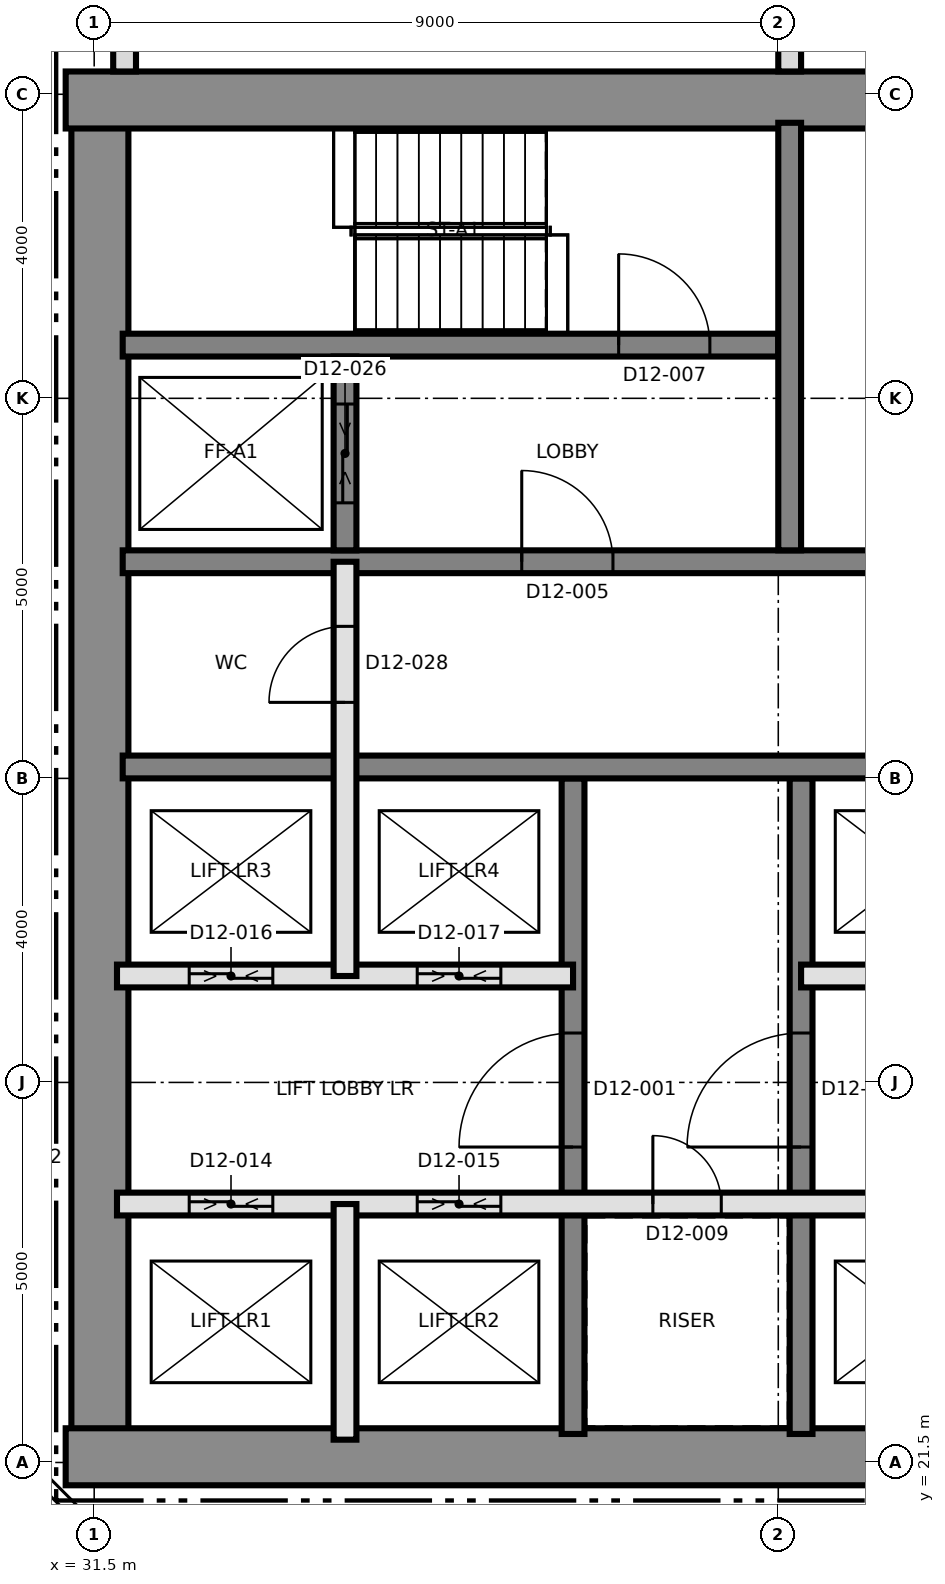
"""IFC4 building model, lengths in metres.
Left out: names, types, materials, properties, quantities, classifications, styles, units other than length and angle.
Written with IfcOpenShell. Run it as: python <this file> out.ifc"""

import sys

from ifc_helpers import new_model, si_unit, direction, frame, frame_2d, origin, place, context, subcontext, project, spatial, rectangle, extrude, element, fill, save


model = new_model("IFC4")
c1 = context("Model", 3, precision=1e-05, world=origin(), true_north=direction((0.0, 1.0)))
c2 = subcontext(c1, "Body", "Model", "MODEL_VIEW")
j1 = project(units=[si_unit("LENGTHUNIT", "METRE"), si_unit("PLANEANGLEUNIT", "RADIAN")], contexts=[c1])
p1 = place(None, origin())
s1 = spatial("IfcSite", under=j1, at=p1, CompositionType="ELEMENT")
p2 = place(p1, origin())
s2 = spatial("IfcBuilding", under=s1, at=p2, CompositionType="ELEMENT")
p3 = place(p2, frame((0.0, 0.0, 135.2)))
s3 = spatial("IfcBuildingStorey", under=s2, at=p3, CompositionType="ELEMENT", Elevation=135.2)
p4 = place(p3, frame((31.575, 21.875, 0.0), z_axis=(0.0, 0.0, 1.0), x_axis=(0.0, 1.0, 0.0)))
e1 = element("IfcWall", 1, at=p4, inside=s3, PredefinedType="SHEAR", context=c2, shape_type="SweptSolid", body=[
    extrude(rectangle(XDim=17.25, YDim=0.75, at=frame_2d((8.625, 0.0))), origin(), (0.0, 0.0, 1.0), 7.0),
])
p5 = place(p3, frame((31.125, 21.575, 0.0), z_axis=(0.0, 0.0, 1.0), x_axis=(1.0, 0.0, 0.0)))
e2 = element("IfcWall", 2, at=p5, inside=s3, PredefinedType="SHEAR", context=c2, shape_type="SweptSolid", body=[
    extrude(rectangle(XDim=27.0, YDim=0.75, at=frame_2d((13.5, 0.0))), origin(), (0.0, 0.0, 1.0), 7.0),
])
p6 = place(p3, frame((31.125, 39.425, 0.0), z_axis=(0.0, 0.0, 1.0), x_axis=(1.0, 0.0, 0.0)))
e3 = element("IfcWall", 3, at=p6, inside=s3, PredefinedType="SHEAR", context=c2, shape_type="SweptSolid", body=[
    extrude(rectangle(XDim=27.0, YDim=0.75, at=frame_2d((13.5, 0.0))), origin(), (0.0, 0.0, 1.0), 7.0),
])
p7 = place(p6, frame((10.575, 0.0, 0.0)))
e4 = element("IfcOpeningElement", 4, at=p7, cuts=e3, PredefinedType="OPENING", context=c2, shape_type="SweptSolid", body=[
    extrude(rectangle(XDim=1.2, YDim=2.1, at=frame_2d((0.6, 1.05))), frame((0.0, 0.385, 0.0), z_axis=(0.0, -1.0, 0.0), x_axis=(1.0, 0.0, 0.0)), (0.0, 0.0, 1.0), 0.77),
])
p8 = place(p3, frame((37.8, 21.875, 0.0), z_axis=(0.0, 0.0, 1.0), x_axis=(0.0, 1.0, 0.0)))
e5 = element("IfcWall", 5, at=p8, inside=s3, PredefinedType="SHEAR", context=c2, shape_type="SweptSolid", body=[
    extrude(rectangle(XDim=8.625, YDim=0.3, at=frame_2d((4.312, 0.0))), origin(), (0.0, 0.0, 1.0), 7.0),
])
p9 = place(p8, frame((3.775, 0.0, 0.0)))
e6 = element("IfcOpeningElement", 6, at=p9, cuts=e5, PredefinedType="OPENING", context=c2, shape_type="SweptSolid", body=[
    extrude(rectangle(XDim=1.5, YDim=2.1, at=frame_2d((0.75, 1.05))), frame((0.0, 0.16, 0.0), z_axis=(0.0, -1.0, 0.0), x_axis=(1.0, 0.0, 0.0)), (0.0, 0.0, 1.0), 0.32),
])
p10 = place(p3, frame((40.8, 21.875, 0.0), z_axis=(0.0, 0.0, 1.0), x_axis=(0.0, 1.0, 0.0)))
e7 = element("IfcWall", 7, at=p10, inside=s3, PredefinedType="SHEAR", context=c2, shape_type="SweptSolid", body=[
    extrude(rectangle(XDim=8.625, YDim=0.3, at=frame_2d((4.312, 0.0))), origin(), (0.0, 0.0, 1.0), 7.0),
])
p11 = place(p10, frame((3.775, 0.0, 0.0)))
e8 = element("IfcOpeningElement", 8, at=p11, cuts=e7, PredefinedType="OPENING", context=c2, shape_type="SweptSolid", body=[
    extrude(rectangle(XDim=1.5, YDim=2.1, at=frame_2d((0.75, 1.05))), frame((0.0, 0.16, 0.0), z_axis=(0.0, -1.0, 0.0), x_axis=(1.0, 0.0, 0.0)), (0.0, 0.0, 1.0), 0.32),
])
p12 = place(p3, frame((31.875, 30.65, 0.0), z_axis=(0.0, 0.0, 1.0), x_axis=(1.0, 0.0, 0.0)))
e9 = element("IfcWall", 9, at=p12, inside=s3, PredefinedType="SHEAR", context=c2, shape_type="SweptSolid", body=[
    extrude(rectangle(XDim=26.25, YDim=0.3, at=frame_2d((13.125, 0.0))), origin(), (0.0, 0.0, 1.0), 7.0),
])
p13 = place(p12, frame((24.625, 0.0, 0.0)))
e10 = element("IfcOpeningElement", 10, at=p13, cuts=e9, PredefinedType="OPENING", context=c2, shape_type="SweptSolid", body=[
    extrude(rectangle(XDim=1.0, YDim=2.1, at=frame_2d((0.5, 1.05))), frame((0.0, 0.16, 0.0), z_axis=(0.0, -1.0, 0.0), x_axis=(1.0, 0.0, 0.0)), (0.0, 0.0, 1.0), 0.32),
])
p14 = place(p3, frame((31.875, 33.35, 0.0), z_axis=(0.0, 0.0, 1.0), x_axis=(1.0, 0.0, 0.0)))
e11 = element("IfcWall", 11, at=p14, inside=s3, PredefinedType="SHEAR", context=c2, shape_type="SweptSolid", body=[
    extrude(rectangle(XDim=26.25, YDim=0.3, at=frame_2d((13.125, 0.0))), origin(), (0.0, 0.0, 1.0), 7.0),
])
p15 = place(p14, frame((13.775, 0.0, 0.0)))
e12 = element("IfcOpeningElement", 12, at=p15, cuts=e11, PredefinedType="OPENING", context=c2, shape_type="SweptSolid", body=[
    extrude(rectangle(XDim=1.4, YDim=2.1, at=frame_2d((0.7, 1.05))), frame((0.0, 0.16, 0.0), z_axis=(0.0, -1.0, 0.0), x_axis=(1.0, 0.0, 0.0)), (0.0, 0.0, 1.0), 0.32),
])
p16 = place(p14, frame((5.25, 0.0, 0.0)))
e13 = element("IfcOpeningElement", 13, at=p16, cuts=e11, PredefinedType="OPENING", context=c2, shape_type="SweptSolid", body=[
    extrude(rectangle(XDim=1.2, YDim=2.1, at=frame_2d((0.6, 1.05))), frame((0.0, 0.16, 0.0), z_axis=(0.0, -1.0, 0.0), x_axis=(1.0, 0.0, 0.0)), (0.0, 0.0, 1.0), 0.32),
])
p17 = place(p14, frame((19.8, 0.0, 0.0)))
e14 = element("IfcOpeningElement", 14, at=p17, cuts=e11, PredefinedType="OPENING", context=c2, shape_type="SweptSolid", body=[
    extrude(rectangle(XDim=1.2, YDim=2.1, at=frame_2d((0.6, 1.05))), frame((0.0, 0.16, 0.0), z_axis=(0.0, -1.0, 0.0), x_axis=(1.0, 0.0, 0.0)), (0.0, 0.0, 1.0), 0.32),
])
p18 = place(p3, frame((31.875, 36.2, 0.0), z_axis=(0.0, 0.0, 1.0), x_axis=(1.0, 0.0, 0.0)))
e15 = element("IfcWall", 15, at=p18, inside=s3, PredefinedType="SHEAR", context=c2, shape_type="SweptSolid", body=[
    extrude(rectangle(XDim=8.625, YDim=0.3, at=frame_2d((4.312, 0.0))), origin(), (0.0, 0.0, 1.0), 7.0),
])
p19 = place(p18, frame((6.525, 0.0, 0.0)))
e16 = element("IfcOpeningElement", 16, at=p19, cuts=e15, PredefinedType="OPENING", context=c2, shape_type="SweptSolid", body=[
    extrude(rectangle(XDim=1.2, YDim=2.1, at=frame_2d((0.6, 1.05))), frame((0.0, 0.16, 0.0), z_axis=(0.0, -1.0, 0.0), x_axis=(1.0, 0.0, 0.0)), (0.0, 0.0, 1.0), 0.32),
])
p20 = place(p3, frame((40.65, 33.5, 0.0), z_axis=(0.0, 0.0, 1.0), x_axis=(0.0, 1.0, 0.0)))
e17 = element("IfcWall", 17, at=p20, inside=s3, PredefinedType="SHEAR", context=c2, shape_type="SweptSolid", body=[
    extrude(rectangle(XDim=5.625, YDim=0.3, at=frame_2d((2.812, 0.0))), origin(), (0.0, 0.0, 1.0), 7.0),
])
p21 = place(p3, frame((34.8, 33.5, 0.0), z_axis=(0.0, 0.0, 1.0), x_axis=(0.0, 1.0, 0.0)))
e18 = element("IfcWall", 18, at=p21, inside=s3, PredefinedType="SHEAR", context=c2, shape_type="SweptSolid", body=[
    extrude(rectangle(XDim=2.55, YDim=0.3, at=frame_2d((1.275, 0.0))), origin(), (0.0, 0.0, 1.0), 7.0),
])
p22 = place(p21, frame((0.625, 0.0, 0.0)))
e19 = element("IfcOpeningElement", 19, at=p22, cuts=e18, PredefinedType="OPENING", context=c2, shape_type="SweptSolid", body=[
    extrude(rectangle(XDim=1.3, YDim=2.4, at=frame_2d((0.65, 1.2))), frame((0.0, 0.16, 0.0), z_axis=(0.0, -1.0, 0.0), x_axis=(1.0, 0.0, 0.0)), (0.0, 0.0, 1.0), 0.32),
])
p23 = place(p3, frame((31.8, 24.9, 0.0), z_axis=(0.0, 0.0, 1.0), x_axis=(1.0, 0.0, 0.0)))
e20 = element("IfcWall", 20, at=p23, inside=s3, PredefinedType="SOLIDWALL", context=c2, shape_type="SweptSolid", body=[
    extrude(rectangle(XDim=24.0, YDim=0.3, at=frame_2d((12.0, 0.0))), origin(), (0.0, 0.0, 1.0), 6.7),
])
p24 = place(p23, frame((7.05, 0.0, 0.0)))
e21 = element("IfcOpeningElement", 21, at=p24, cuts=e20, PredefinedType="OPENING", context=c2, shape_type="SweptSolid", body=[
    extrude(rectangle(XDim=0.9, YDim=2.1, at=frame_2d((0.45, 1.05))), frame((0.0, 0.16, 0.0), z_axis=(0.0, -1.0, 0.0), x_axis=(1.0, 0.0, 0.0)), (0.0, 0.0, 1.0), 0.32),
])
p25 = place(p23, frame((16.05, 0.0, 0.0)))
e22 = element("IfcOpeningElement", 22, at=p25, cuts=e20, PredefinedType="OPENING", context=c2, shape_type="SweptSolid", body=[
    extrude(rectangle(XDim=0.9, YDim=2.1, at=frame_2d((0.45, 1.05))), frame((0.0, 0.16, 0.0), z_axis=(0.0, -1.0, 0.0), x_axis=(1.0, 0.0, 0.0)), (0.0, 0.0, 1.0), 0.32),
])
p26 = place(p23, frame((0.95, 0.0, 0.0)))
e23 = element("IfcOpeningElement", 23, at=p26, cuts=e20, PredefinedType="OPENING", context=c2, shape_type="SweptSolid", body=[
    extrude(rectangle(XDim=1.1, YDim=2.4, at=frame_2d((0.55, 1.2))), frame((0.0, 0.16, 0.0), z_axis=(0.0, -1.0, 0.0), x_axis=(1.0, 0.0, 0.0)), (0.0, 0.0, 1.0), 0.32),
])
p27 = place(p23, frame((3.95, 0.0, 0.0)))
e24 = element("IfcOpeningElement", 24, at=p27, cuts=e20, PredefinedType="OPENING", context=c2, shape_type="SweptSolid", body=[
    extrude(rectangle(XDim=1.1, YDim=2.4, at=frame_2d((0.55, 1.2))), frame((0.0, 0.16, 0.0), z_axis=(0.0, -1.0, 0.0), x_axis=(1.0, 0.0, 0.0)), (0.0, 0.0, 1.0), 0.32),
])
p28 = place(p23, frame((9.95, 0.0, 0.0)))
e25 = element("IfcOpeningElement", 25, at=p28, cuts=e20, PredefinedType="OPENING", context=c2, shape_type="SweptSolid", body=[
    extrude(rectangle(XDim=1.1, YDim=2.4, at=frame_2d((0.55, 1.2))), frame((0.0, 0.16, 0.0), z_axis=(0.0, -1.0, 0.0), x_axis=(1.0, 0.0, 0.0)), (0.0, 0.0, 1.0), 0.32),
])
p29 = place(p23, frame((12.95, 0.0, 0.0)))
e26 = element("IfcOpeningElement", 26, at=p29, cuts=e20, PredefinedType="OPENING", context=c2, shape_type="SweptSolid", body=[
    extrude(rectangle(XDim=1.1, YDim=2.4, at=frame_2d((0.55, 1.2))), frame((0.0, 0.16, 0.0), z_axis=(0.0, -1.0, 0.0), x_axis=(1.0, 0.0, 0.0)), (0.0, 0.0, 1.0), 0.32),
])
p30 = place(p23, frame((18.95, 0.0, 0.0)))
e27 = element("IfcOpeningElement", 27, at=p30, cuts=e20, PredefinedType="OPENING", context=c2, shape_type="SweptSolid", body=[
    extrude(rectangle(XDim=1.1, YDim=2.4, at=frame_2d((0.55, 1.2))), frame((0.0, 0.16, 0.0), z_axis=(0.0, -1.0, 0.0), x_axis=(1.0, 0.0, 0.0)), (0.0, 0.0, 1.0), 0.32),
])
p31 = place(p23, frame((21.95, 0.0, 0.0)))
e28 = element("IfcOpeningElement", 28, at=p31, cuts=e20, PredefinedType="OPENING", context=c2, shape_type="SweptSolid", body=[
    extrude(rectangle(XDim=1.1, YDim=2.4, at=frame_2d((0.55, 1.2))), frame((0.0, 0.16, 0.0), z_axis=(0.0, -1.0, 0.0), x_axis=(1.0, 0.0, 0.0)), (0.0, 0.0, 1.0), 0.32),
])
p32 = place(p3, frame((31.8, 27.9, 0.0), z_axis=(0.0, 0.0, 1.0), x_axis=(1.0, 0.0, 0.0)))
e29 = element("IfcWall", 29, at=p32, inside=s3, PredefinedType="SOLIDWALL", context=c2, shape_type="SweptSolid", body=[
    extrude(rectangle(XDim=6.0, YDim=0.3, at=frame_2d((3.0, 0.0))), origin(), (0.0, 0.0, 1.0), 6.7),
])
p33 = place(p32, frame((0.95, 0.0, 0.0)))
e30 = element("IfcOpeningElement", 30, at=p33, cuts=e29, PredefinedType="OPENING", context=c2, shape_type="SweptSolid", body=[
    extrude(rectangle(XDim=1.1, YDim=2.4, at=frame_2d((0.55, 1.2))), frame((0.0, 0.16, 0.0), z_axis=(0.0, -1.0, 0.0), x_axis=(1.0, 0.0, 0.0)), (0.0, 0.0, 1.0), 0.32),
])
p34 = place(p32, frame((3.95, 0.0, 0.0)))
e31 = element("IfcOpeningElement", 31, at=p34, cuts=e29, PredefinedType="OPENING", context=c2, shape_type="SweptSolid", body=[
    extrude(rectangle(XDim=1.1, YDim=2.4, at=frame_2d((0.55, 1.2))), frame((0.0, 0.16, 0.0), z_axis=(0.0, -1.0, 0.0), x_axis=(1.0, 0.0, 0.0)), (0.0, 0.0, 1.0), 0.32),
])
p35 = place(p3, frame((40.8, 27.9, 0.0), z_axis=(0.0, 0.0, 1.0), x_axis=(1.0, 0.0, 0.0)))
e32 = element("IfcWall", 32, at=p35, inside=s3, PredefinedType="SOLIDWALL", context=c2, shape_type="SweptSolid", body=[
    extrude(rectangle(XDim=6.0, YDim=0.3, at=frame_2d((3.0, 0.0))), origin(), (0.0, 0.0, 1.0), 6.7),
])
p36 = place(p35, frame((0.95, 0.0, 0.0)))
e33 = element("IfcOpeningElement", 33, at=p36, cuts=e32, PredefinedType="OPENING", context=c2, shape_type="SweptSolid", body=[
    extrude(rectangle(XDim=1.1, YDim=2.4, at=frame_2d((0.55, 1.2))), frame((0.0, 0.16, 0.0), z_axis=(0.0, -1.0, 0.0), x_axis=(1.0, 0.0, 0.0)), (0.0, 0.0, 1.0), 0.32),
])
p37 = place(p35, frame((3.95, 0.0, 0.0)))
e34 = element("IfcOpeningElement", 34, at=p37, cuts=e32, PredefinedType="OPENING", context=c2, shape_type="SweptSolid", body=[
    extrude(rectangle(XDim=1.1, YDim=2.4, at=frame_2d((0.55, 1.2))), frame((0.0, 0.16, 0.0), z_axis=(0.0, -1.0, 0.0), x_axis=(1.0, 0.0, 0.0)), (0.0, 0.0, 1.0), 0.32),
])
p38 = place(p3, frame((34.8, 21.8, 0.0), z_axis=(0.0, 0.0, 1.0), x_axis=(0.0, 1.0, 0.0)))
e35 = element("IfcWall", 35, at=p38, inside=s3, PredefinedType="SOLIDWALL", context=c2, shape_type="SweptSolid", body=[
    extrude(rectangle(XDim=3.1, YDim=0.3, at=frame_2d((1.55, 0.0))), origin(), (0.0, 0.0, 1.0), 6.7),
])
p39 = place(p3, frame((34.8, 27.9, 0.0), z_axis=(0.0, 0.0, 1.0), x_axis=(0.0, 1.0, 0.0)))
e36 = element("IfcWall", 36, at=p39, inside=s3, PredefinedType="SOLIDWALL", context=c2, shape_type="SweptSolid", body=[
    extrude(rectangle(XDim=5.45, YDim=0.3, at=frame_2d((2.725, 0.0))), origin(), (0.0, 0.0, 1.0), 6.7),
])
p40 = place(p39, frame((3.6, 0.0, 0.0)))
e37 = element("IfcOpeningElement", 37, at=p40, cuts=e36, PredefinedType="OPENING", context=c2, shape_type="SweptSolid", body=[
    extrude(rectangle(XDim=1.0, YDim=2.1, at=frame_2d((0.5, 1.05))), frame((0.0, 0.16, 0.0), z_axis=(0.0, -1.0, 0.0), x_axis=(1.0, 0.0, 0.0)), (0.0, 0.0, 1.0), 0.32),
])
p41 = place(p3, frame((31.9, 39.8, 0.0), z_axis=(0.0, 0.0, 1.0), x_axis=(0.0, 1.0, 0.0)))
e38 = element("IfcWall", 38, at=p41, inside=s3, PredefinedType="PARTITIONING", context=c2, shape_type="SweptSolid", body=[
    extrude(rectangle(XDim=25.65, YDim=0.3, at=frame_2d((12.825, 0.0))), origin(), (0.0, 0.0, 1.0), 6.7),
])
p42 = place(p3, frame((40.65, 39.8, 0.0), z_axis=(0.0, 0.0, 1.0), x_axis=(0.0, 1.0, 0.0)))
e39 = element("IfcWall", 39, at=p42, inside=s3, PredefinedType="PARTITIONING", context=c2, shape_type="SweptSolid", body=[
    extrude(rectangle(XDim=25.95, YDim=0.3, at=frame_2d((12.975, 0.0))), origin(), (0.0, 0.0, 1.0), 6.7),
])
p43 = place(p42, frame((1.35, 0.0, 0.0)))
e40 = element("IfcOpeningElement", 40, at=p43, cuts=e39, PredefinedType="OPENING", context=c2, shape_type="SweptSolid", body=[
    extrude(rectangle(XDim=1.2, YDim=2.1, at=frame_2d((0.6, 1.05))), frame((0.0, 0.16, 0.0), z_axis=(0.0, -1.0, 0.0), x_axis=(1.0, 0.0, 0.0)), (0.0, 0.0, 1.0), 0.32),
])
p44 = place(p42, frame((5.85, 0.0, 0.0)))
e41 = element("IfcOpeningElement", 41, at=p44, cuts=e39, PredefinedType="OPENING", context=c2, shape_type="SweptSolid", body=[
    extrude(rectangle(XDim=1.2, YDim=2.1, at=frame_2d((0.6, 1.05))), frame((0.0, 0.16, 0.0), z_axis=(0.0, -1.0, 0.0), x_axis=(1.0, 0.0, 0.0)), (0.0, 0.0, 1.0), 0.32),
])
p45 = place(p42, frame((10.35, 0.0, 0.0)))
e42 = element("IfcOpeningElement", 42, at=p45, cuts=e39, PredefinedType="OPENING", context=c2, shape_type="SweptSolid", body=[
    extrude(rectangle(XDim=1.2, YDim=2.1, at=frame_2d((0.6, 1.05))), frame((0.0, 0.16, 0.0), z_axis=(0.0, -1.0, 0.0), x_axis=(1.0, 0.0, 0.0)), (0.0, 0.0, 1.0), 0.32),
])
p46 = place(p42, frame((14.85, 0.0, 0.0)))
e43 = element("IfcOpeningElement", 43, at=p46, cuts=e39, PredefinedType="OPENING", context=c2, shape_type="SweptSolid", body=[
    extrude(rectangle(XDim=1.2, YDim=2.1, at=frame_2d((0.6, 1.05))), frame((0.0, 0.16, 0.0), z_axis=(0.0, -1.0, 0.0), x_axis=(1.0, 0.0, 0.0)), (0.0, 0.0, 1.0), 0.32),
])
p47 = place(p42, frame((19.087, 0.0, 0.0)))
e44 = element("IfcOpeningElement", 44, at=p47, cuts=e39, PredefinedType="OPENING", context=c2, shape_type="SweptSolid", body=[
    extrude(rectangle(XDim=1.2, YDim=2.1, at=frame_2d((0.6, 1.05))), frame((0.0, 0.16, 0.0), z_axis=(0.0, -1.0, 0.0), x_axis=(1.0, 0.0, 0.0)), (0.0, 0.0, 1.0), 0.32),
])
p48 = place(p42, frame((23.063, 0.0, 0.0)))
e45 = element("IfcOpeningElement", 45, at=p48, cuts=e39, PredefinedType="OPENING", context=c2, shape_type="SweptSolid", body=[
    extrude(rectangle(XDim=1.2, YDim=2.1, at=frame_2d((0.6, 1.05))), frame((0.0, 0.16, 0.0), z_axis=(0.0, -1.0, 0.0), x_axis=(1.0, 0.0, 0.0)), (0.0, 0.0, 1.0), 0.32),
])
p49 = place(p9, origin())
e46 = element("IfcDoor", 46, at=p49, inside=s3, OperationType="SINGLE_SWING_LEFT", PredefinedType="DOOR", context=c2, shape_type="SweptSolid", body=[
    extrude(rectangle(XDim=1.5, YDim=2.1, at=frame_2d((0.75, 1.05))), frame((0.0, 0.025, 0.0), z_axis=(0.0, -1.0, 0.0), x_axis=(1.0, 0.0, 0.0)), (0.0, 0.0, 1.0), 0.05),
])
fill(e6, e46)
p50 = place(p11, origin())
e47 = element("IfcDoor", 47, at=p50, inside=s3, OperationType="SINGLE_SWING_RIGHT", PredefinedType="DOOR", context=c2, shape_type="SweptSolid", body=[
    extrude(rectangle(XDim=1.5, YDim=2.1, at=frame_2d((0.75, 1.05))), frame((0.0, 0.025, 0.0), z_axis=(0.0, -1.0, 0.0), x_axis=(1.0, 0.0, 0.0)), (0.0, 0.0, 1.0), 0.05),
])
fill(e8, e47)
p51 = place(p16, origin())
e48 = element("IfcDoor", 48, at=p51, inside=s3, OperationType="SINGLE_SWING_LEFT", PredefinedType="DOOR", context=c2, shape_type="SweptSolid", body=[
    extrude(rectangle(XDim=1.2, YDim=2.1, at=frame_2d((0.6, 1.05))), frame((0.0, 0.025, 0.0), z_axis=(0.0, -1.0, 0.0), x_axis=(1.0, 0.0, 0.0)), (0.0, 0.0, 1.0), 0.05),
])
fill(e13, e48)
p52 = place(p19, origin())
e49 = element("IfcDoor", 49, at=p52, inside=s3, OperationType="SINGLE_SWING_RIGHT", PredefinedType="DOOR", context=c2, shape_type="SweptSolid", body=[
    extrude(rectangle(XDim=1.2, YDim=2.1, at=frame_2d((0.6, 1.05))), frame((0.0, 0.025, 0.0), z_axis=(0.0, -1.0, 0.0), x_axis=(1.0, 0.0, 0.0)), (0.0, 0.0, 1.0), 0.05),
])
fill(e16, e49)
p53 = place(p24, origin())
e50 = element("IfcDoor", 50, at=p53, inside=s3, OperationType="SINGLE_SWING_LEFT", PredefinedType="DOOR", context=c2, shape_type="SweptSolid", body=[
    extrude(rectangle(XDim=0.9, YDim=2.1, at=frame_2d((0.45, 1.05))), frame((0.0, 0.025, 0.0), z_axis=(0.0, -1.0, 0.0), x_axis=(1.0, 0.0, 0.0)), (0.0, 0.0, 1.0), 0.05),
])
fill(e21, e50)
p54 = place(p26, origin())
e51 = element("IfcDoor", 51, at=p54, inside=s3, OperationType="SLIDING_TO_LEFT", PredefinedType="DOOR", context=c2, shape_type="SweptSolid", body=[
    extrude(rectangle(XDim=1.1, YDim=2.4, at=frame_2d((0.55, 1.2))), frame((0.0, 0.025, 0.0), z_axis=(0.0, -1.0, 0.0), x_axis=(1.0, 0.0, 0.0)), (0.0, 0.0, 1.0), 0.05),
])
fill(e23, e51)
p55 = place(p27, origin())
e52 = element("IfcDoor", 52, at=p55, inside=s3, OperationType="SLIDING_TO_LEFT", PredefinedType="DOOR", context=c2, shape_type="SweptSolid", body=[
    extrude(rectangle(XDim=1.1, YDim=2.4, at=frame_2d((0.55, 1.2))), frame((0.0, 0.025, 0.0), z_axis=(0.0, -1.0, 0.0), x_axis=(1.0, 0.0, 0.0)), (0.0, 0.0, 1.0), 0.05),
])
fill(e24, e52)
p56 = place(p33, origin())
e53 = element("IfcDoor", 53, at=p56, inside=s3, OperationType="SLIDING_TO_LEFT", PredefinedType="DOOR", context=c2, shape_type="SweptSolid", body=[
    extrude(rectangle(XDim=1.1, YDim=2.4, at=frame_2d((0.55, 1.2))), frame((0.0, 0.025, 0.0), z_axis=(0.0, -1.0, 0.0), x_axis=(1.0, 0.0, 0.0)), (0.0, 0.0, 1.0), 0.05),
])
fill(e30, e53)
p57 = place(p34, origin())
e54 = element("IfcDoor", 54, at=p57, inside=s3, OperationType="SLIDING_TO_LEFT", PredefinedType="DOOR", context=c2, shape_type="SweptSolid", body=[
    extrude(rectangle(XDim=1.1, YDim=2.4, at=frame_2d((0.55, 1.2))), frame((0.0, 0.025, 0.0), z_axis=(0.0, -1.0, 0.0), x_axis=(1.0, 0.0, 0.0)), (0.0, 0.0, 1.0), 0.05),
])
fill(e31, e54)
p58 = place(p22, origin())
e55 = element("IfcDoor", 55, at=p58, inside=s3, OperationType="SLIDING_TO_LEFT", PredefinedType="DOOR", context=c2, shape_type="SweptSolid", body=[
    extrude(rectangle(XDim=1.3, YDim=2.4, at=frame_2d((0.65, 1.2))), frame((0.0, 0.025, 0.0), z_axis=(0.0, -1.0, 0.0), x_axis=(1.0, 0.0, 0.0)), (0.0, 0.0, 1.0), 0.05),
])
fill(e19, e55)
p59 = place(p40, origin())
e56 = element("IfcDoor", 56, at=p59, inside=s3, OperationType="SINGLE_SWING_LEFT", PredefinedType="DOOR", context=c2, shape_type="SweptSolid", body=[
    extrude(rectangle(XDim=1.0, YDim=2.1, at=frame_2d((0.5, 1.05))), frame((0.0, 0.025, 0.0), z_axis=(0.0, -1.0, 0.0), x_axis=(1.0, 0.0, 0.0)), (0.0, 0.0, 1.0), 0.05),
])
fill(e37, e56)
save(model, sys.argv[1])
